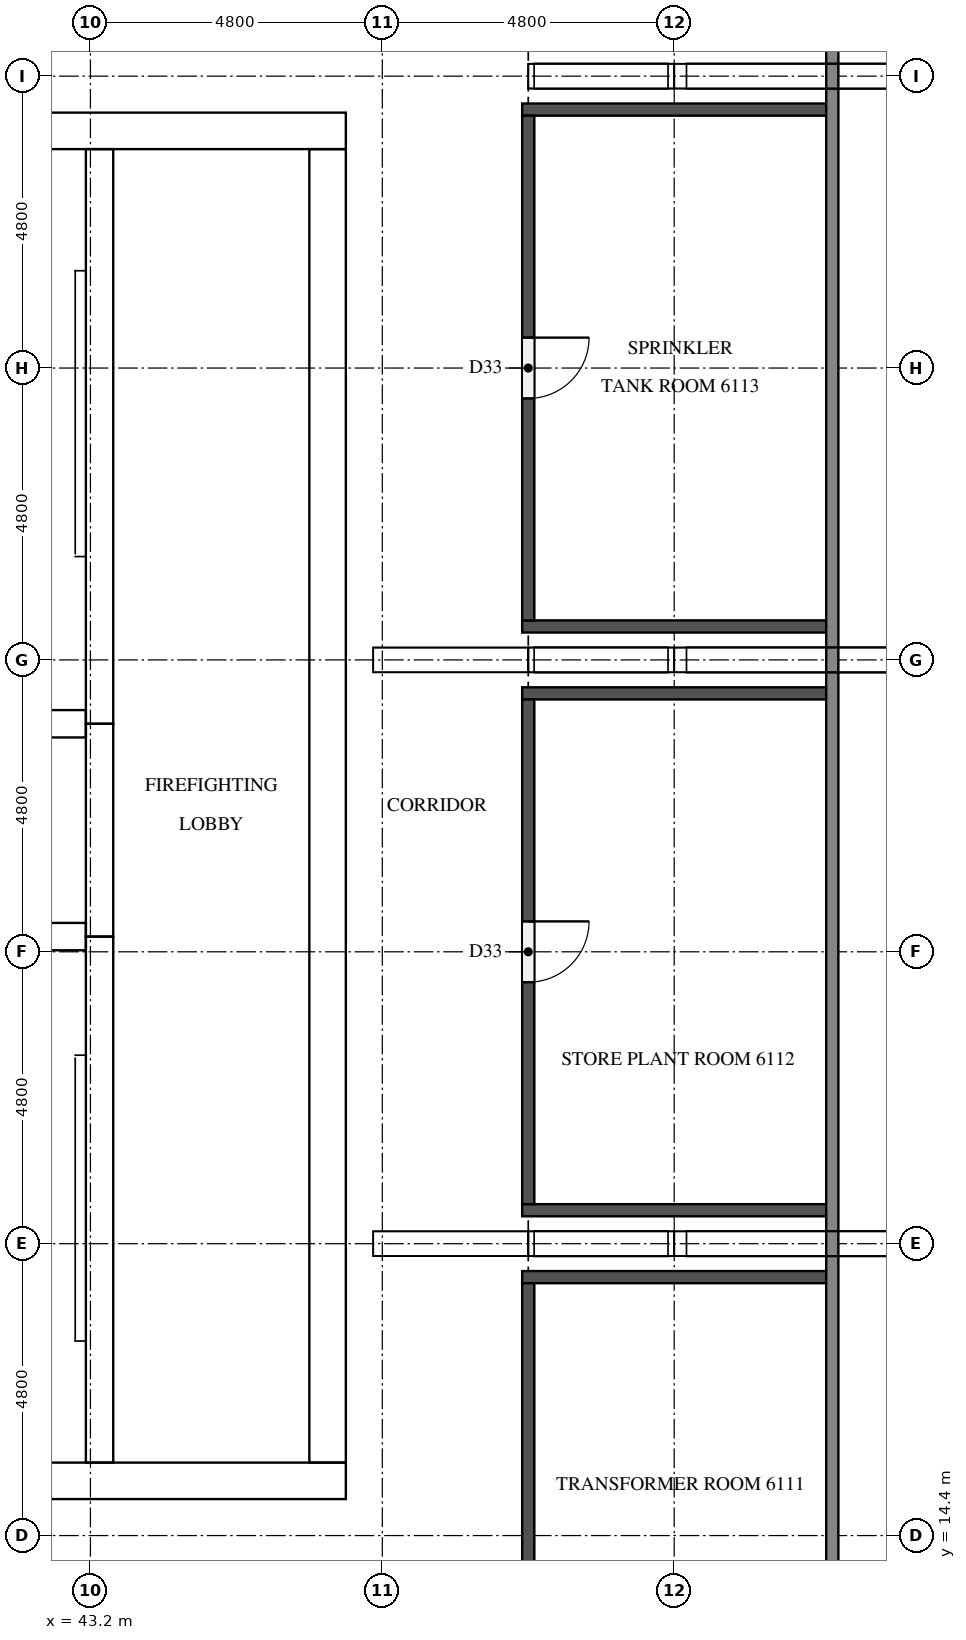
"""IFC4 building model, lengths in metres.
Left out: names, types, materials, properties, quantities, classifications, styles, units other than length and angle.
Written with IfcOpenShell. Run it as: python <this file> out.ifc"""

import sys

from ifc_helpers import new_model, si_unit, direction, frame, frame_2d, origin, place, context, subcontext, project, spatial, rectangle, extrude, element, fill, save


model = new_model("IFC4")
c1 = context("Model", 3, precision=1e-05, world=origin(), true_north=direction((0.0, 1.0)))
c2 = subcontext(c1, "Body", "Model", "MODEL_VIEW")
j1 = project(units=[si_unit("LENGTHUNIT", "METRE"), si_unit("PLANEANGLEUNIT", "RADIAN")], contexts=[c1])
p1 = place(None, origin())
s1 = spatial("IfcSite", under=j1, at=p1, CompositionType="ELEMENT")
p2 = place(p1, origin())
s2 = spatial("IfcBuilding", under=s1, at=p2, CompositionType="ELEMENT")
p3 = place(p2, frame((0.0, 0.0, 233.3)))
s3 = spatial("IfcBuildingStorey", under=s2, at=p3, CompositionType="ELEMENT", Elevation=233.3)
p4 = place(p3, frame((15.0, 15.3, 0.0), z_axis=(0.0, 0.0, 1.0), x_axis=(1.0, 0.0, 0.0)))
e1 = element("IfcWall", 1, at=p4, inside=s3, PredefinedType="SHEAR", context=c2, shape_type="SweptSolid", body=[
    extrude(rectangle(XDim=32.4, YDim=0.6, at=frame_2d((16.2, 0.0))), origin(), (0.0, 0.0, 1.0), 5.1),
])
p5 = place(p4, frame((15.3, 0.0, 0.0)))
e2 = element("IfcOpeningElement", 2, at=p5, cuts=e1, PredefinedType="OPENING", context=c2, shape_type="SweptSolid", body=[
    extrude(rectangle(XDim=1.8, YDim=2.1, at=frame_2d((0.9, 1.05))), frame((0.0, 0.31, 0.0), z_axis=(0.0, -1.0, 0.0), x_axis=(1.0, 0.0, 0.0)), (0.0, 0.0, 1.0), 0.62),
])
p6 = place(p3, frame((15.0, 37.5, 0.0), z_axis=(0.0, 0.0, 1.0), x_axis=(1.0, 0.0, 0.0)))
e3 = element("IfcWall", 3, at=p6, inside=s3, PredefinedType="SHEAR", context=c2, shape_type="SweptSolid", body=[
    extrude(rectangle(XDim=32.4, YDim=0.6, at=frame_2d((16.2, 0.0))), origin(), (0.0, 0.0, 1.0), 5.1),
])
p7 = place(p6, frame((15.3, 0.0, 0.0)))
e4 = element("IfcOpeningElement", 4, at=p7, cuts=e3, PredefinedType="OPENING", context=c2, shape_type="SweptSolid", body=[
    extrude(rectangle(XDim=1.8, YDim=2.1, at=frame_2d((0.9, 1.05))), frame((0.0, 0.31, 0.0), z_axis=(0.0, -1.0, 0.0), x_axis=(1.0, 0.0, 0.0)), (0.0, 0.0, 1.0), 0.62),
])
p8 = place(p6, frame((1.25, 0.0, 0.0)))
e5 = element("IfcOpeningElement", 5, at=p8, cuts=e3, PredefinedType="OPENING", context=c2, shape_type="SweptSolid", body=[
    extrude(rectangle(XDim=1.0, YDim=2.1, at=frame_2d((0.5, 1.05))), frame((0.0, 0.31, 0.0), z_axis=(0.0, -1.0, 0.0), x_axis=(1.0, 0.0, 0.0)), (0.0, 0.0, 1.0), 0.62),
])
p9 = place(p6, frame((4.988, 0.0, 0.0)))
e6 = element("IfcOpeningElement", 6, at=p9, cuts=e3, PredefinedType="OPENING", context=c2, shape_type="SweptSolid", body=[
    extrude(rectangle(XDim=1.0, YDim=2.1, at=frame_2d((0.5, 1.05))), frame((0.0, 0.31, 0.0), z_axis=(0.0, -1.0, 0.0), x_axis=(1.0, 0.0, 0.0)), (0.0, 0.0, 1.0), 0.62),
])
p10 = place(p3, frame((47.1, 15.6, 0.0), z_axis=(0.0, 0.0, 1.0), x_axis=(0.0, 1.0, 0.0)))
e7 = element("IfcWall", 7, at=p10, inside=s3, PredefinedType="SHEAR", context=c2, shape_type="SweptSolid", body=[
    extrude(rectangle(XDim=21.6, YDim=0.6, at=frame_2d((10.8, 0.0))), origin(), (0.0, 0.0, 1.0), 5.1),
])
p11 = place(p10, frame((10.5, 0.0, 0.0)))
e8 = element("IfcOpeningElement", 8, at=p11, cuts=e7, PredefinedType="OPENING", context=c2, shape_type="SweptSolid", body=[
    extrude(rectangle(XDim=1.2, YDim=2.1, at=frame_2d((0.6, 1.05))), frame((0.0, 0.31, 0.0), z_axis=(0.0, -1.0, 0.0), x_axis=(1.0, 0.0, 0.0)), (0.0, 0.0, 1.0), 0.62),
])
p12 = place(p3, frame((43.35, 15.6, 0.0), z_axis=(0.0, 0.0, 1.0), x_axis=(0.0, 1.0, 0.0)))
e9 = element("IfcWall", 9, at=p12, inside=s3, PredefinedType="SHEAR", context=c2, shape_type="SweptSolid", body=[
    extrude(rectangle(XDim=8.65, YDim=0.45, at=frame_2d((4.325, 0.0))), origin(), (0.0, 0.0, 1.0), 5.1),
])
p13 = place(p12, frame((0.6, 0.0, 0.0)))
e10 = element("IfcOpeningElement", 10, at=p13, cuts=e9, PredefinedType="OPENING", context=c2, shape_type="SweptSolid", body=[
    extrude(rectangle(XDim=1.2, YDim=2.1, at=frame_2d((0.6, 1.05))), frame((0.0, 0.235, 0.0), z_axis=(0.0, -1.0, 0.0), x_axis=(1.0, 0.0, 0.0)), (0.0, 0.0, 1.0), 0.47),
])
p14 = place(p3, frame((43.35, 24.25, 0.0), z_axis=(0.0, 0.0, 1.0), x_axis=(0.0, 1.0, 0.0)))
e11 = element("IfcWall", 11, at=p14, inside=s3, PredefinedType="SHEAR", context=c2, shape_type="SweptSolid", body=[
    extrude(rectangle(XDim=3.5, YDim=0.45, at=frame_2d((1.75, 0.0))), origin(), (0.0, 0.0, 1.0), 5.1),
])
p15 = place(p14, frame((1.2, 0.0, 0.0)))
e12 = element("IfcOpeningElement", 12, at=p15, cuts=e11, PredefinedType="OPENING", context=c2, shape_type="SweptSolid", body=[
    extrude(rectangle(XDim=1.1, YDim=2.1, at=frame_2d((0.55, 1.05))), frame((0.0, 0.235, 0.0), z_axis=(0.0, -1.0, 0.0), x_axis=(1.0, 0.0, 0.0)), (0.0, 0.0, 1.0), 0.47),
])
p16 = place(p3, frame((43.35, 27.75, 0.0), z_axis=(0.0, 0.0, 1.0), x_axis=(0.0, 1.0, 0.0)))
e13 = element("IfcWall", 13, at=p16, inside=s3, PredefinedType="SHEAR", context=c2, shape_type="SweptSolid", body=[
    extrude(rectangle(XDim=9.45, YDim=0.45, at=frame_2d((4.725, 0.0))), origin(), (0.0, 0.0, 1.0), 5.1),
])
p17 = place(p16, frame((7.65, 0.0, 0.0)))
e14 = element("IfcOpeningElement", 14, at=p17, cuts=e13, PredefinedType="OPENING", context=c2, shape_type="SweptSolid", body=[
    extrude(rectangle(XDim=1.2, YDim=2.1, at=frame_2d((0.6, 1.05))), frame((0.0, 0.235, 0.0), z_axis=(0.0, -1.0, 0.0), x_axis=(1.0, 0.0, 0.0)), (0.0, 0.0, 1.0), 0.47),
])
for number, where, z_axis, x_axis in (
    (15, (39.525, 24.25, 0.0), (0.0, 0.0, 1.0), (1.0, 0.0, 0.0)),
    (16, (39.525, 27.75, 0.0), (0.0, 0.0, 1.0), (1.0, 0.0, 0.0)),
):
    element("IfcWall", number, at=place(p3, frame(where, z_axis=z_axis, x_axis=x_axis)), inside=s3, PredefinedType="SHEAR", context=c2, shape_type="SweptSolid", body=[
        extrude(rectangle(XDim=3.6, YDim=0.45, at=frame_2d((1.8, 0.0))), origin(), (0.0, 0.0, 1.0), 5.1),
    ])
for number, where, z_axis, x_axis in (
    (17, (50.3, 18.65, 0.0), (0.0, 0.0, 1.0), (1.0, 0.0, 0.0)),
    (18, (50.3, 19.75, 0.0), (0.0, 0.0, 1.0), (1.0, 0.0, 0.0)),
    (19, (50.3, 28.25, 0.0), (0.0, 0.0, 1.0), (1.0, 0.0, 0.0)),
    (20, (50.3, 29.35, 0.0), (0.0, 0.0, 1.0), (1.0, 0.0, 0.0)),
    (21, (50.3, 37.85, 0.0), (0.0, 0.0, 1.0), (1.0, 0.0, 0.0)),
):
    element("IfcWall", number, at=place(p3, frame(where, z_axis=z_axis, x_axis=x_axis)), inside=s3, PredefinedType="PARTITIONING", context=c2, shape_type="SweptSolid", body=[
        extrude(rectangle(XDim=5.0, YDim=0.2, at=frame_2d((2.5, 0.0))), origin(), (0.0, 0.0, 1.0), 5.1),
    ])
p18 = place(p3, frame((50.4, 12.1, 0.0), z_axis=(0.0, 0.0, 1.0), x_axis=(0.0, 1.0, 0.0)))
e22 = element("IfcWall", 22, at=p18, inside=s3, PredefinedType="PARTITIONING", context=c2, shape_type="SweptSolid", body=[
    extrude(rectangle(XDim=6.45, YDim=0.2, at=frame_2d((3.225, 0.0))), origin(), (0.0, 0.0, 1.0), 5.1),
])
p19 = place(p3, frame((50.4, 28.15, 0.0), z_axis=(0.0, 0.0, 1.0), x_axis=(0.0, -1.0, 0.0)))
e23 = element("IfcWall", 23, at=p19, inside=s3, PredefinedType="PARTITIONING", context=c2, shape_type="SweptSolid", body=[
    extrude(rectangle(XDim=8.3, YDim=0.2, at=frame_2d((4.15, 0.0))), origin(), (0.0, 0.0, 1.0), 5.1),
])
p20 = place(p19, frame((3.65, 0.0, 0.0)))
e24 = element("IfcOpeningElement", 24, at=p20, cuts=e23, PredefinedType="OPENING", context=c2, shape_type="SweptSolid", body=[
    extrude(rectangle(XDim=1.0, YDim=2.1, at=frame_2d((0.5, 1.05))), frame((0.0, 0.11, 0.0), z_axis=(0.0, -1.0, 0.0), x_axis=(1.0, 0.0, 0.0)), (0.0, 0.0, 1.0), 0.22),
])
p21 = place(p3, frame((50.4, 37.75, 0.0), z_axis=(0.0, 0.0, 1.0), x_axis=(0.0, -1.0, 0.0)))
e25 = element("IfcWall", 25, at=p21, inside=s3, PredefinedType="PARTITIONING", context=c2, shape_type="SweptSolid", body=[
    extrude(rectangle(XDim=8.3, YDim=0.2, at=frame_2d((4.15, 0.0))), origin(), (0.0, 0.0, 1.0), 5.1),
])
p22 = place(p21, frame((3.65, 0.0, 0.0)))
e26 = element("IfcOpeningElement", 26, at=p22, cuts=e25, PredefinedType="OPENING", context=c2, shape_type="SweptSolid", body=[
    extrude(rectangle(XDim=1.0, YDim=2.1, at=frame_2d((0.5, 1.05))), frame((0.0, 0.11, 0.0), z_axis=(0.0, -1.0, 0.0), x_axis=(1.0, 0.0, 0.0)), (0.0, 0.0, 1.0), 0.22),
])
p23 = place(p15, origin())
e27 = element("IfcDoor", 27, at=p23, inside=s3, OperationType="DOUBLE_DOOR_SLIDING", PredefinedType="DOOR", context=c2, shape_type="SweptSolid", body=[
    extrude(rectangle(XDim=1.1, YDim=2.1, at=frame_2d((0.55, 1.05))), frame((0.0, 0.025, 0.0), z_axis=(0.0, -1.0, 0.0), x_axis=(1.0, 0.0, 0.0)), (0.0, 0.0, 1.0), 0.05),
])
fill(e12, e27)
p24 = place(p13, origin())
e28 = element("IfcDoor", 28, at=p24, inside=s3, OperationType="SINGLE_SWING_RIGHT", PredefinedType="DOOR", context=c2, shape_type="SweptSolid", body=[
    extrude(rectangle(XDim=1.2, YDim=2.1, at=frame_2d((0.6, 1.05))), frame((0.0, 0.025, 0.0), z_axis=(0.0, -1.0, 0.0), x_axis=(1.0, 0.0, 0.0)), (0.0, 0.0, 1.0), 0.05),
])
fill(e10, e28)
p25 = place(p17, origin())
e29 = element("IfcDoor", 29, at=p25, inside=s3, OperationType="SINGLE_SWING_LEFT", PredefinedType="DOOR", context=c2, shape_type="SweptSolid", body=[
    extrude(rectangle(XDim=1.2, YDim=2.1, at=frame_2d((0.6, 1.05))), frame((0.0, 0.025, 0.0), z_axis=(0.0, -1.0, 0.0), x_axis=(1.0, 0.0, 0.0)), (0.0, 0.0, 1.0), 0.05),
])
fill(e14, e29)
p26 = place(p11, origin())
e30 = element("IfcDoor", 30, at=p26, inside=s3, OperationType="SINGLE_SWING_LEFT", PredefinedType="DOOR", context=c2, shape_type="SweptSolid", body=[
    extrude(rectangle(XDim=1.2, YDim=2.1, at=frame_2d((0.6, 1.05))), frame((0.0, 0.025, 0.0), z_axis=(0.0, -1.0, 0.0), x_axis=(1.0, 0.0, 0.0)), (0.0, 0.0, 1.0), 0.05),
])
fill(e8, e30)
p27 = place(p20, origin())
e31 = element("IfcDoor", 31, at=p27, inside=s3, OperationType="SINGLE_SWING_LEFT", PredefinedType="DOOR", context=c2, shape_type="SweptSolid", body=[
    extrude(rectangle(XDim=1.0, YDim=2.1, at=frame_2d((0.5, 1.05))), frame((0.0, 0.025, 0.0), z_axis=(0.0, -1.0, 0.0), x_axis=(1.0, 0.0, 0.0)), (0.0, 0.0, 1.0), 0.05),
])
fill(e24, e31)
p28 = place(p22, origin())
e32 = element("IfcDoor", 32, at=p28, inside=s3, OperationType="SINGLE_SWING_LEFT", PredefinedType="DOOR", context=c2, shape_type="SweptSolid", body=[
    extrude(rectangle(XDim=1.0, YDim=2.1, at=frame_2d((0.5, 1.05))), frame((0.0, 0.025, 0.0), z_axis=(0.0, -1.0, 0.0), x_axis=(1.0, 0.0, 0.0)), (0.0, 0.0, 1.0), 0.05),
])
fill(e26, e32)
save(model, sys.argv[1])
